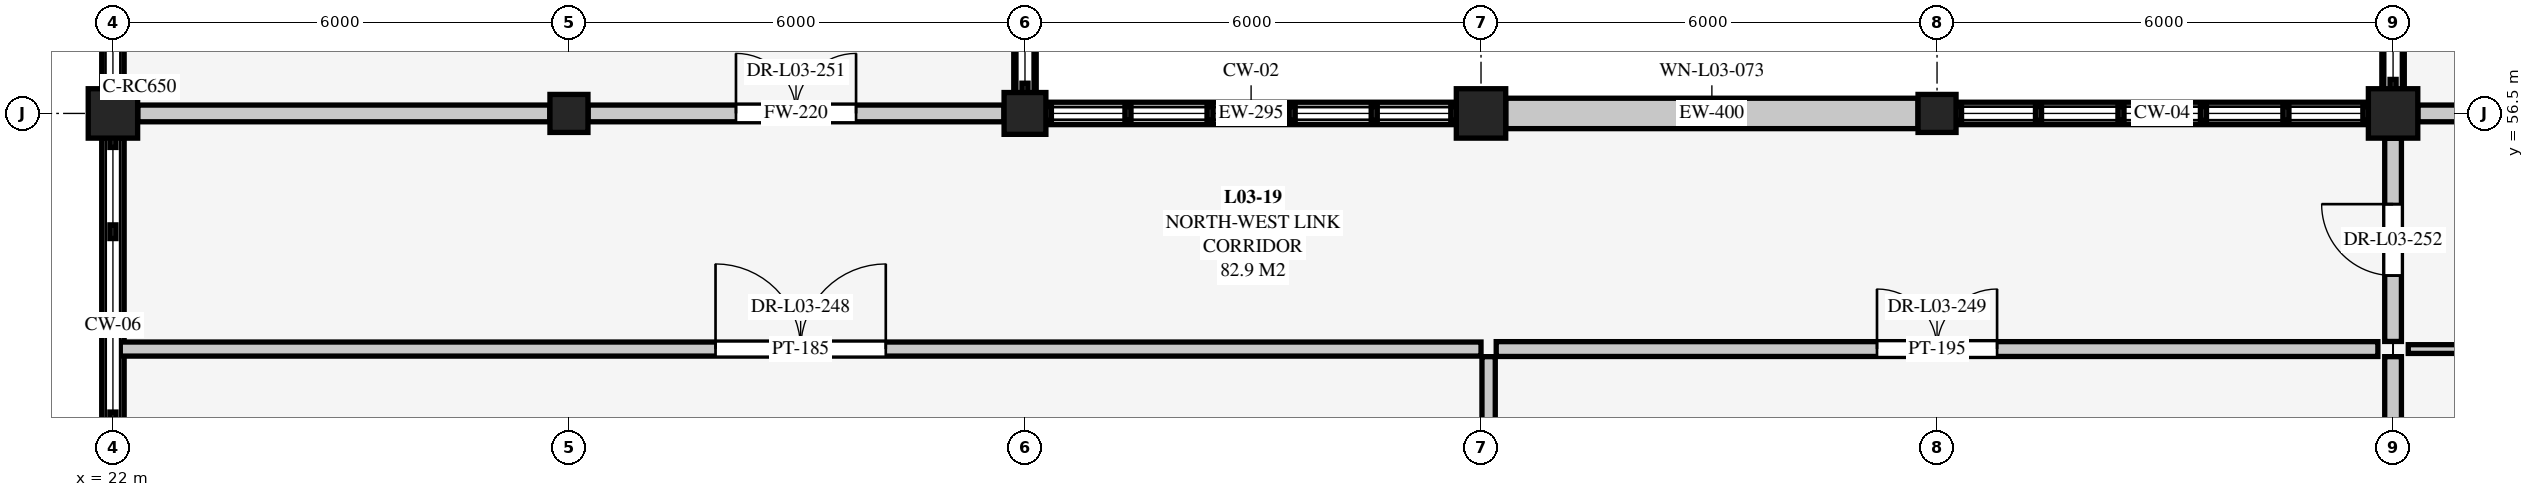
"""IFC4 building model, lengths in metres.
Left out: names, types, materials, properties, quantities, classifications, styles, units other than length and angle.
Written with IfcOpenShell. Run it as: python <this file> out.ifc"""

import sys

from ifc_helpers import new_model, si_unit, direction, frame, frame_2d, origin, origin_2d, place, context, subcontext, project, spatial, rectangle, extrude, element, fill, save


model = new_model("IFC4")
c1 = context("Model", 3, precision=1e-05, world=origin(), true_north=direction((0.0, 1.0)))
c2 = subcontext(c1, "Body", "Model", "MODEL_VIEW")
j1 = project(units=[si_unit("LENGTHUNIT", "METRE"), si_unit("PLANEANGLEUNIT", "RADIAN")], contexts=[c1])
p1 = place(None, origin())
s1 = spatial("IfcSite", under=j1, at=p1, CompositionType="ELEMENT")
p2 = place(p1, origin())
s2 = spatial("IfcBuilding", under=s1, at=p2, CompositionType="ELEMENT")
p3 = place(p2, frame((0.0, 0.0, 9.0)))
s3 = spatial("IfcBuildingStorey", under=s2, at=p3, CompositionType="ELEMENT", Elevation=9.0)
p4 = place(p3, frame((22.0, 56.5, 0.0), z_axis=(0.0, 0.0, 1.0), x_axis=(1.0, 0.0, 0.0)))
e1 = element("IfcColumn", 1, at=p4, inside=s3, PredefinedType="COLUMN", context=c2, shape_type="SweptSolid", body=[
    extrude(rectangle(XDim=0.65, YDim=0.65, at=origin_2d()), origin(), (0.0, 0.0, 1.0), 4.5),
])
p5 = place(p3, frame((28.0, 56.5, 0.0), z_axis=(0.0, 0.0, 1.0), x_axis=(1.0, 0.0, 0.0)))
e2 = element("IfcColumn", 2, at=p5, inside=s3, PredefinedType="COLUMN", context=c2, shape_type="SweptSolid", body=[
    extrude(rectangle(XDim=0.5, YDim=0.5, at=origin_2d()), origin(), (0.0, 0.0, 1.0), 4.5),
])
p6 = place(p3, frame((34.0, 56.5, 0.0), z_axis=(0.0, 0.0, 1.0), x_axis=(1.0, 0.0, 0.0)))
e3 = element("IfcColumn", 3, at=p6, inside=s3, PredefinedType="COLUMN", context=c2, shape_type="SweptSolid", body=[
    extrude(rectangle(XDim=0.55, YDim=0.55, at=origin_2d()), origin(), (0.0, 0.0, 1.0), 4.5),
])
p7 = place(p3, frame((40.0, 56.5, 0.0), z_axis=(0.0, 0.0, 1.0), x_axis=(1.0, 0.0, 0.0)))
e4 = element("IfcColumn", 4, at=p7, inside=s3, PredefinedType="COLUMN", context=c2, shape_type="SweptSolid", body=[
    extrude(rectangle(XDim=0.65, YDim=0.65, at=origin_2d()), origin(), (0.0, 0.0, 1.0), 4.5),
])
p8 = place(p3, frame((46.0, 56.5, 0.0), z_axis=(0.0, 0.0, 1.0), x_axis=(1.0, 0.0, 0.0)))
e5 = element("IfcColumn", 5, at=p8, inside=s3, PredefinedType="COLUMN", context=c2, shape_type="SweptSolid", body=[
    extrude(rectangle(XDim=0.5, YDim=0.5, at=origin_2d()), origin(), (0.0, 0.0, 1.0), 4.5),
])
p9 = place(p3, frame((52.0, 56.5, 0.0), z_axis=(0.0, 0.0, 1.0), x_axis=(1.0, 0.0, 0.0)))
e6 = element("IfcColumn", 6, at=p9, inside=s3, PredefinedType="COLUMN", context=c2, shape_type="SweptSolid", body=[
    extrude(rectangle(XDim=0.65, YDim=0.65, at=origin_2d()), origin(), (0.0, 0.0, 1.0), 4.5),
])
p10 = place(p3, frame((34.275, 56.5, 0.0), z_axis=(0.0, 0.0, 1.0), x_axis=(1.0, 0.0, 0.0)))
e7 = element("IfcWall", 7, at=p10, inside=s3, PredefinedType="SOLIDWALL", context=c2, shape_type="SweptSolid", body=[
    extrude(rectangle(XDim=5.4, YDim=0.295, at=frame_2d((2.7, 0.0))), origin(), (0.0, 0.0, 1.0), 0.21),
])
p11 = place(p3, frame((40.325, 56.5, 0.0), z_axis=(0.0, 0.0, 1.0), x_axis=(1.0, 0.0, 0.0)))
e8 = element("IfcWall", 8, at=p11, inside=s3, PredefinedType="SOLIDWALL", context=c2, shape_type="SweptSolid", body=[
    extrude(rectangle(XDim=5.425, YDim=0.4, at=frame_2d((2.712, 0.0))), origin(), (0.0, 0.0, 1.0), 3.893),
])
p12 = place(p11, frame((2.288, 0.0, 0.9)))
e9 = element("IfcOpeningElement", 9, at=p12, cuts=e8, PredefinedType="OPENING", context=c2, shape_type="SweptSolid", body=[
    extrude(rectangle(XDim=0.85, YDim=1.95, at=frame_2d((0.425, 0.975))), frame((0.0, 0.21, 0.0), z_axis=(0.0, -1.0, 0.0), x_axis=(1.0, 0.0, 0.0)), (0.0, 0.0, 1.0), 0.42),
])
p13 = place(p3, frame((46.25, 56.5, 0.0), z_axis=(0.0, 0.0, 1.0), x_axis=(1.0, 0.0, 0.0)))
e10 = element("IfcWall", 10, at=p13, inside=s3, PredefinedType="SOLIDWALL", context=c2, shape_type="SweptSolid", body=[
    extrude(rectangle(XDim=5.425, YDim=0.295, at=frame_2d((2.712, 0.0))), origin(), (0.0, 0.0, 1.0), 0.31),
])
p14 = place(p3, frame((22.0, 51.25, 0.0), z_axis=(0.0, 0.0, 1.0), x_axis=(0.0, 1.0, 0.0)))
e11 = element("IfcWall", 11, at=p14, inside=s3, PredefinedType="SOLIDWALL", context=c2, shape_type="SweptSolid", body=[
    extrude(rectangle(XDim=4.925, YDim=0.295, at=frame_2d((2.462, 0.0))), origin(), (0.0, 0.0, 1.0), 0.41),
])
p15 = place(p3, frame((22.0, 56.825, 0.0), z_axis=(0.0, 0.0, 1.0), x_axis=(0.0, 1.0, 0.0)))
e12 = element("IfcWall", 12, at=p15, inside=s3, PredefinedType="SOLIDWALL", context=c2, shape_type="SweptSolid", body=[
    extrude(rectangle(XDim=4.375, YDim=0.295, at=frame_2d((2.188, 0.0))), origin(), (0.0, 0.0, 1.0), 0.46),
])
p16 = place(p3, frame((34.0, 61.25, 0.0), z_axis=(0.0, 0.0, 1.0), x_axis=(0.0, -1.0, 0.0)))
e13 = element("IfcWall", 13, at=p16, inside=s3, PredefinedType="SOLIDWALL", context=c2, shape_type="SweptSolid", body=[
    extrude(rectangle(XDim=4.475, YDim=0.295, at=frame_2d((2.238, 0.0))), origin(), (0.0, 0.0, 1.0), 0.52),
])
p17 = place(p3, frame((52.0, 56.825, 0.0), z_axis=(0.0, 0.0, 1.0), x_axis=(0.0, 1.0, 0.0)))
e14 = element("IfcWall", 14, at=p17, inside=s3, PredefinedType="SOLIDWALL", context=c2, shape_type="SweptSolid", body=[
    extrude(rectangle(XDim=4.375, YDim=0.295, at=frame_2d((2.188, 0.0))), origin(), (0.0, 0.0, 1.0), 0.16),
])
p18 = place(p3, frame((40.1, 51.327, 0.0), z_axis=(0.0, 0.0, 1.0), x_axis=(0.0, 1.0, 0.0)))
e15 = element("IfcWall", 15, at=p18, inside=s3, PredefinedType="PARTITIONING", context=c2, shape_type="SweptSolid", body=[
    extrude(rectangle(XDim=1.973, YDim=0.175, at=frame_2d((0.987, 0.0))), origin(), (0.0, 0.0, 1.0), 4.3),
])
p19 = place(p3, frame((22.097, 53.4, 0.0), z_axis=(0.0, 0.0, 1.0), x_axis=(1.0, 0.0, 0.0)))
e16 = element("IfcWall", 16, at=p19, inside=s3, PredefinedType="PARTITIONING", context=c2, shape_type="SweptSolid", body=[
    extrude(rectangle(XDim=17.903, YDim=0.185, at=frame_2d((8.952, 0.0))), origin(), (0.0, 0.0, 1.0), 4.3),
])
p20 = place(p19, frame((7.832, 0.0, 0.0)))
e17 = element("IfcOpeningElement", 17, at=p20, cuts=e16, PredefinedType="OPENING", context=c2, shape_type="SweptSolid", body=[
    extrude(rectangle(XDim=2.24, YDim=2.4, at=frame_2d((1.12, 1.2))), frame((0.0, 0.103, 0.0), z_axis=(0.0, -1.0, 0.0), x_axis=(1.0, 0.0, 0.0)), (0.0, 0.0, 1.0), 0.205),
])
p21 = place(p3, frame((40.2, 53.4, 0.0), z_axis=(0.0, 0.0, 1.0), x_axis=(1.0, 0.0, 0.0)))
e18 = element("IfcWall", 18, at=p21, inside=s3, PredefinedType="PARTITIONING", context=c2, shape_type="SweptSolid", body=[
    extrude(rectangle(XDim=11.6, YDim=0.195, at=frame_2d((5.8, 0.0))), origin(), (0.0, 0.0, 1.0), 4.3),
])
p22 = place(p21, frame((5.01, 0.0, 0.0)))
e19 = element("IfcOpeningElement", 19, at=p22, cuts=e18, PredefinedType="OPENING", context=c2, shape_type="SweptSolid", body=[
    extrude(rectangle(XDim=1.58, YDim=2.2, at=frame_2d((0.79, 1.1))), frame((0.0, 0.108, 0.0), z_axis=(0.0, -1.0, 0.0), x_axis=(1.0, 0.0, 0.0)), (0.0, 0.0, 1.0), 0.215),
])
p23 = place(p3, frame((52.0, 51.252, 0.0), z_axis=(0.0, 0.0, 1.0), x_axis=(0.0, 1.0, 0.0)))
e20 = element("IfcWall", 20, at=p23, inside=s3, PredefinedType="SOLIDWALL", context=c2, shape_type="SweptSolid", body=[
    extrude(rectangle(XDim=2.048, YDim=0.22, at=frame_2d((1.024, 0.0))), origin(), (0.0, 0.0, 1.0), 3.886),
])
p24 = place(p3, frame((28.252, 56.5, 0.0), z_axis=(0.0, 0.0, 1.0), x_axis=(1.0, 0.0, 0.0)))
e21 = element("IfcWall", 21, at=p24, inside=s3, PredefinedType="SOLIDWALL", context=c2, shape_type="SweptSolid", body=[
    extrude(rectangle(XDim=5.471, YDim=0.22, at=frame_2d((2.735, 0.0))), origin(), (0.0, 0.0, 1.0), 3.725),
])
p25 = place(p24, frame((1.946, 0.0, 0.0)))
e22 = element("IfcOpeningElement", 22, at=p25, cuts=e21, PredefinedType="OPENING", context=c2, shape_type="SweptSolid", body=[
    extrude(rectangle(XDim=1.58, YDim=2.2, at=frame_2d((0.79, 1.1))), frame((0.0, 0.12, 0.0), z_axis=(0.0, -1.0, 0.0), x_axis=(1.0, 0.0, 0.0)), (0.0, 0.0, 1.0), 0.24),
])
p26 = place(p3, frame((22.327, 56.5, 0.0), z_axis=(0.0, 0.0, 1.0), x_axis=(1.0, 0.0, 0.0)))
e23 = element("IfcWall", 23, at=p26, inside=s3, PredefinedType="SOLIDWALL", context=c2, shape_type="SweptSolid", body=[
    extrude(rectangle(XDim=5.421, YDim=0.22, at=frame_2d((2.71, 0.0))), origin(), (0.0, 0.0, 1.0), 3.801),
])
p27 = place(p3, frame((52.0, 53.5, 0.0), z_axis=(0.0, 0.0, 1.0), x_axis=(0.0, 1.0, 0.0)))
e24 = element("IfcWall", 24, at=p27, inside=s3, PredefinedType="SOLIDWALL", context=c2, shape_type="SweptSolid", body=[
    extrude(rectangle(XDim=2.673, YDim=0.22, at=frame_2d((1.336, 0.0))), origin(), (0.0, 0.0, 1.0), 3.886),
])
p28 = place(p27, frame((0.866, 0.0, 0.0)))
e25 = element("IfcOpeningElement", 25, at=p28, cuts=e24, PredefinedType="OPENING", context=c2, shape_type="SweptSolid", body=[
    extrude(rectangle(XDim=0.94, YDim=2.1, at=frame_2d((0.47, 1.05))), frame((0.0, 0.12, 0.0), z_axis=(0.0, -1.0, 0.0), x_axis=(1.0, 0.0, 0.0)), (0.0, 0.0, 1.0), 0.24),
])
p29 = place(p3, frame((52.2, 53.4, 0.0), z_axis=(0.0, 0.0, 1.0), x_axis=(1.0, 0.0, 0.0)))
e26 = element("IfcWall", 26, at=p29, inside=s3, PredefinedType="PARTITIONING", context=c2, shape_type="SweptSolid", body=[
    extrude(rectangle(XDim=11.6, YDim=0.115, at=frame_2d((5.8, 0.0))), origin(), (0.0, 0.0, 1.0), 4.276),
])
p30 = place(p29, frame((4.68, 0.0, 0.0)))
e27 = element("IfcOpeningElement", 27, at=p30, cuts=e26, PredefinedType="OPENING", context=c2, shape_type="SweptSolid", body=[
    extrude(rectangle(XDim=2.24, YDim=2.4, at=frame_2d((1.12, 1.2))), frame((0.0, 0.068, 0.0), z_axis=(0.0, -1.0, 0.0), x_axis=(1.0, 0.0, 0.0)), (0.0, 0.0, 1.0), 0.135),
])
p31 = place(p3, frame((52.327, 56.5, 0.0), z_axis=(0.0, 0.0, 1.0), x_axis=(1.0, 0.0, 0.0)))
e28 = element("IfcWall", 28, at=p31, inside=s3, PredefinedType="SOLIDWALL", context=c2, shape_type="SweptSolid", body=[
    extrude(rectangle(XDim=5.396, YDim=0.22, at=frame_2d((2.698, 0.0))), origin(), (0.0, 0.0, 1.0), 3.623),
])
p32 = place(p31, frame((1.908, 0.0, 0.0)))
e29 = element("IfcOpeningElement", 29, at=p32, cuts=e28, PredefinedType="OPENING", context=c2, shape_type="SweptSolid", body=[
    extrude(rectangle(XDim=1.58, YDim=2.2, at=frame_2d((0.79, 1.1))), frame((0.0, 0.12, 0.0), z_axis=(0.0, -1.0, 0.0), x_axis=(1.0, 0.0, 0.0)), (0.0, 0.0, 1.0), 0.24),
])
p33 = place(p12, origin())
e30 = element("IfcWindow", 30, at=p33, inside=s3, PartitioningType="SINGLE_PANEL", PredefinedType="WINDOW", context=c2, shape_type="SweptSolid", body=[
    extrude(rectangle(XDim=0.85, YDim=1.95, at=frame_2d((0.425, 0.975))), frame((0.0, 0.03, 0.0), z_axis=(0.0, -1.0, 0.0), x_axis=(1.0, 0.0, 0.0)), (0.0, 0.0, 1.0), 0.06),
])
fill(e9, e30)
p34 = place(p20, origin())
e31 = element("IfcDoor", 31, at=p34, inside=s3, OperationType="DOUBLE_DOOR_SINGLE_SWING", PredefinedType="DOOR", context=c2, shape_type="SweptSolid", body=[
    extrude(rectangle(XDim=2.24, YDim=2.4, at=frame_2d((1.12, 1.2))), frame((0.0, 0.025, 0.0), z_axis=(0.0, -1.0, 0.0), x_axis=(1.0, 0.0, 0.0)), (0.0, 0.0, 1.0), 0.05),
])
fill(e17, e31)
p35 = place(p22, origin())
e32 = element("IfcDoor", 32, at=p35, inside=s3, OperationType="DOUBLE_DOOR_SINGLE_SWING", PredefinedType="DOOR", context=c2, shape_type="SweptSolid", body=[
    extrude(rectangle(XDim=1.58, YDim=2.2, at=frame_2d((0.79, 1.1))), frame((0.0, 0.025, 0.0), z_axis=(0.0, -1.0, 0.0), x_axis=(1.0, 0.0, 0.0)), (0.0, 0.0, 1.0), 0.05),
])
fill(e19, e32)
p36 = place(p25, origin())
e33 = element("IfcDoor", 33, at=p36, inside=s3, OperationType="DOUBLE_DOOR_SINGLE_SWING", PredefinedType="DOOR", context=c2, shape_type="SweptSolid", body=[
    extrude(rectangle(XDim=1.58, YDim=2.2, at=frame_2d((0.79, 1.1))), frame((0.0, 0.025, 0.0), z_axis=(0.0, -1.0, 0.0), x_axis=(1.0, 0.0, 0.0)), (0.0, 0.0, 1.0), 0.05),
])
fill(e22, e33)
p37 = place(p28, origin())
e34 = element("IfcDoor", 34, at=p37, inside=s3, OperationType="SINGLE_SWING_RIGHT", PredefinedType="DOOR", context=c2, shape_type="SweptSolid", body=[
    extrude(rectangle(XDim=0.94, YDim=2.1, at=frame_2d((0.47, 1.05))), frame((0.0, 0.025, 0.0), z_axis=(0.0, -1.0, 0.0), x_axis=(1.0, 0.0, 0.0)), (0.0, 0.0, 1.0), 0.05),
])
fill(e25, e34)
save(model, sys.argv[1])
